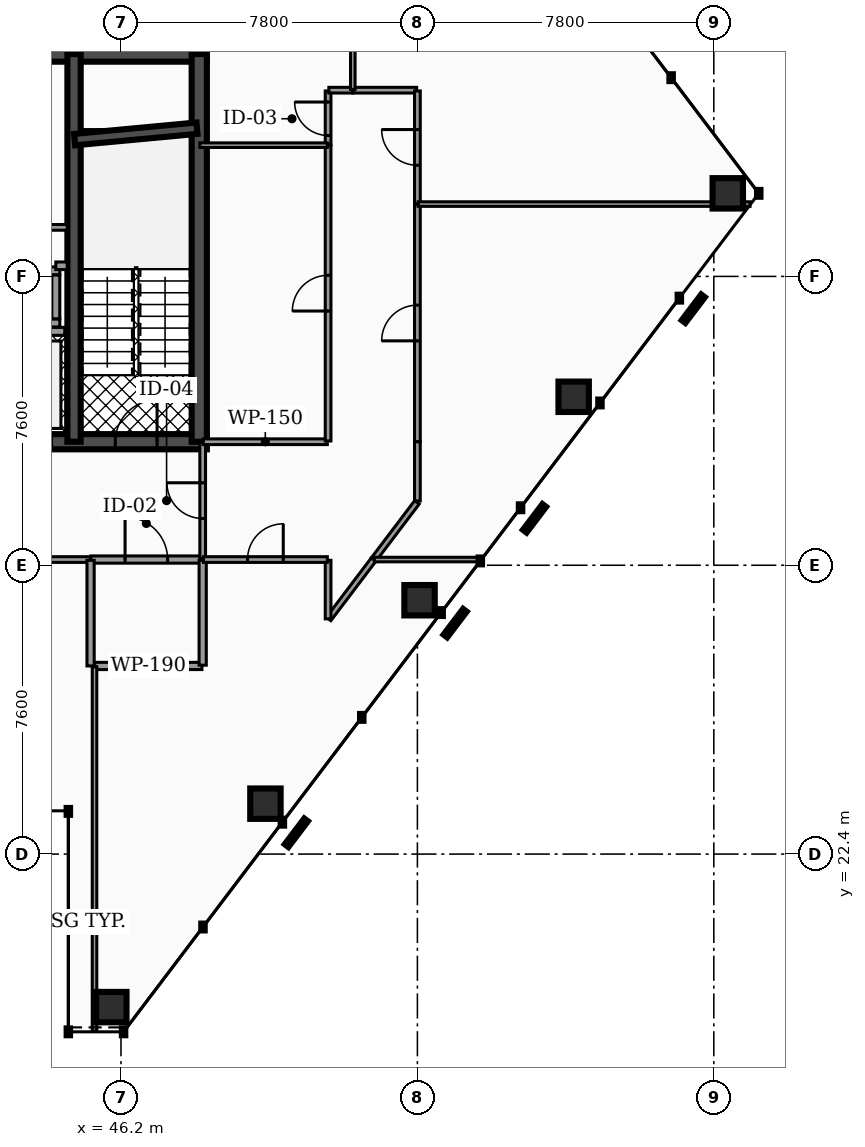
"""IFC4 building model, lengths in metres.
Left out: names, types, materials, properties, quantities, classifications, styles, units other than length and angle.
Written with IfcOpenShell. Run it as: python <this file> out.ifc"""

import sys

from ifc_helpers import new_model, si_unit, direction, frame, frame_2d, origin, origin_2d, place, context, subcontext, project, spatial, rectangle, hollow_rectangle, extrude, element, fill, save


model = new_model("IFC4")
c1 = context("Model", 3, precision=1e-05, world=origin(), true_north=direction((0.0, 1.0)))
c2 = subcontext(c1, "Body", "Model", "MODEL_VIEW")
j1 = project(units=[si_unit("LENGTHUNIT", "METRE"), si_unit("PLANEANGLEUNIT", "RADIAN")], contexts=[c1])
p1 = place(None, origin())
s1 = spatial("IfcSite", under=j1, at=p1, CompositionType="ELEMENT")
p2 = place(p1, origin())
s2 = spatial("IfcBuilding", under=s1, at=p2, CompositionType="ELEMENT")
p3 = place(p2, frame((0.0, 0.0, 160.82)))
s3 = spatial("IfcBuildingStorey", under=s2, at=p3, CompositionType="ELEMENT", Elevation=160.82)
p4 = place(p3, frame((28.4, 43.45, 0.0), z_axis=(0.0, 0.0, 1.0), x_axis=(1.0, 0.0, 0.0)))
e1 = element("IfcWall", 1, at=p4, inside=s3, PredefinedType="SHEAR", context=c2, shape_type="SweptSolid", body=[
    extrude(rectangle(XDim=20.06, YDim=0.4, at=frame_2d((10.03, 0.0))), origin(), (0.0, 0.0, 1.0), 3.5),
])
p5 = place(p3, frame((28.4, 33.25, 0.0), z_axis=(0.0, 0.0, 1.0), x_axis=(1.0, 0.0, 0.0)))
e2 = element("IfcWall", 2, at=p5, inside=s3, PredefinedType="SHEAR", context=c2, shape_type="SweptSolid", body=[
    extrude(rectangle(XDim=20.06, YDim=0.4, at=frame_2d((10.03, 0.0))), origin(), (0.0, 0.0, 1.0), 3.5),
])
p6 = place(p5, frame((4.03, 0.0, 0.0)))
e3 = element("IfcOpeningElement", 3, at=p6, cuts=e2, PredefinedType="OPENING", context=c2, shape_type="SweptSolid", body=[
    extrude(rectangle(XDim=1.1, YDim=2.15, at=frame_2d((0.55, 1.075))), frame((0.0, 0.21, 0.0), z_axis=(0.0, -1.0, 0.0), x_axis=(1.0, 0.0, 0.0)), (0.0, 0.0, 1.0), 0.42),
])
p7 = place(p5, frame((14.87, 0.0, 0.0)))
e4 = element("IfcOpeningElement", 4, at=p7, cuts=e2, PredefinedType="OPENING", context=c2, shape_type="SweptSolid", body=[
    extrude(rectangle(XDim=1.1, YDim=2.15, at=frame_2d((0.55, 1.075))), frame((0.0, 0.21, 0.0), z_axis=(0.0, -1.0, 0.0), x_axis=(1.0, 0.0, 0.0)), (0.0, 0.0, 1.0), 0.42),
])
p8 = place(p5, frame((5.95, 0.0, 0.0)))
e5 = element("IfcOpeningElement", 5, at=p8, cuts=e2, PredefinedType="OPENING", context=c2, shape_type="SweptSolid", body=[
    extrude(rectangle(XDim=1.0, YDim=2.1, at=frame_2d((0.5, 1.05))), frame((0.0, 0.21, 0.0), z_axis=(0.0, -1.0, 0.0), x_axis=(1.0, 0.0, 0.0)), (0.0, 0.0, 1.0), 0.42),
])
p9 = place(p5, frame((7.65, 0.0, 0.0)))
e6 = element("IfcOpeningElement", 6, at=p9, cuts=e2, PredefinedType="OPENING", context=c2, shape_type="SweptSolid", body=[
    extrude(rectangle(XDim=1.0, YDim=2.1, at=frame_2d((0.5, 1.05))), frame((0.0, 0.21, 0.0), z_axis=(0.0, -1.0, 0.0), x_axis=(1.0, 0.0, 0.0)), (0.0, 0.0, 1.0), 0.42),
])
p10 = place(p5, frame((1.31, 0.0, 0.0)))
e7 = element("IfcOpeningElement", 7, at=p10, cuts=e2, PredefinedType="OPENING", context=c2, shape_type="SweptSolid", body=[
    extrude(rectangle(XDim=1.1, YDim=2.2, at=frame_2d((0.55, 1.1))), frame((0.0, 0.21, 0.0), z_axis=(0.0, -1.0, 0.0), x_axis=(1.0, 0.0, 0.0)), (0.0, 0.0, 1.0), 0.42),
])
p11 = place(p5, frame((9.44, 0.0, 0.0)))
e8 = element("IfcOpeningElement", 8, at=p11, cuts=e2, PredefinedType="OPENING", context=c2, shape_type="SweptSolid", body=[
    extrude(rectangle(XDim=1.12, YDim=2.05, at=frame_2d((0.56, 1.025))), frame((0.0, 0.21, 0.0), z_axis=(0.0, -1.0, 0.0), x_axis=(1.0, 0.0, 0.0)), (0.0, 0.0, 1.0), 0.42),
])
p12 = place(p5, frame((17.65, 0.0, 0.0)))
e9 = element("IfcOpeningElement", 9, at=p12, cuts=e2, PredefinedType="OPENING", context=c2, shape_type="SweptSolid", body=[
    extrude(rectangle(XDim=1.1, YDim=2.2, at=frame_2d((0.55, 1.1))), frame((0.0, 0.21, 0.0), z_axis=(0.0, -1.0, 0.0), x_axis=(1.0, 0.0, 0.0)), (0.0, 0.0, 1.0), 0.42),
])
p13 = place(p3, frame((44.965, 33.25, 0.0), z_axis=(0.0, 0.0, 1.0), x_axis=(0.0, 1.0, 0.0)))
e10 = element("IfcWall", 10, at=p13, inside=s3, PredefinedType="SHEAR", context=c2, shape_type="SweptSolid", body=[
    extrude(rectangle(XDim=10.2, YDim=0.35, at=frame_2d((5.1, 0.0))), origin(), (0.0, 0.0, 1.0), 3.5),
])
p14 = place(p3, frame((48.26, 33.25, 0.0), z_axis=(0.0, 0.0, 1.0), x_axis=(0.0, 1.0, 0.0)))
e11 = element("IfcWall", 11, at=p14, inside=s3, PredefinedType="SHEAR", context=c2, shape_type="SweptSolid", body=[
    extrude(rectangle(XDim=10.2, YDim=0.4, at=frame_2d((5.1, 0.0))), origin(), (0.0, 0.0, 1.0), 3.5),
])
p15 = place(p3, frame((44.98, 41.2, 0.0), z_axis=(0.0, 0.0, 1.0), x_axis=(0.995686468965, 0.09278176286, 0.0)))
e12 = element("IfcWall", 12, at=p15, inside=s3, PredefinedType="SHEAR", context=c2, shape_type="SweptSolid", body=[
    extrude(rectangle(XDim=3.234, YDim=0.3, at=frame_2d((1.617, 0.0))), origin(), (0.0, 0.0, 1.0), 3.5),
])
p16 = place(p3, frame((45.946, 18.373, 0.0), z_axis=(-0.058828651938, -0.019980855747, 0.998068111461), x_axis=(0.321601382502, -0.946875150573, 0.0)))
e13 = element("IfcColumn", 13, at=p16, inside=s3, PredefinedType="COLUMN", context=c2, shape_type="SweptSolid", body=[
    extrude(hollow_rectangle(XDim=0.8, YDim=0.8, WallThickness=0.04, at=origin_2d()), origin(), (0.0, 0.0, 1.0), 3.507),
])
p17 = place(p3, frame((50.001, 23.727, 0.0), z_axis=(-0.041676780558, 0.002648357293, 0.999127635573), x_axis=(-0.063417240527, -0.997987100921, 0.0)))
e14 = element("IfcColumn", 14, at=p17, inside=s3, PredefinedType="COLUMN", context=c2, shape_type="SweptSolid", body=[
    extrude(hollow_rectangle(XDim=0.8, YDim=0.8, WallThickness=0.04, at=origin_2d()), origin(), (0.0, 0.0, 1.0), 3.503),
])
p18 = place(p3, frame((54.056, 29.08, 0.0), z_axis=(-0.0244686005, 0.025374844962, 0.999378509291), x_axis=(-0.719844295421, -0.694135570584, 0.0)))
e15 = element("IfcColumn", 15, at=p18, inside=s3, PredefinedType="COLUMN", context=c2, shape_type="SweptSolid", body=[
    extrude(hollow_rectangle(XDim=0.8, YDim=0.8, WallThickness=0.04, at=origin_2d()), origin(), (0.0, 0.0, 1.0), 3.502),
])
p19 = place(p3, frame((58.112, 34.433, 0.0), z_axis=(-0.007315554229, 0.048073642076, 0.998817004062), x_axis=(-0.98861883734, -0.150441996986, 0.0)))
e16 = element("IfcColumn", 16, at=p19, inside=s3, PredefinedType="COLUMN", context=c2, shape_type="SweptSolid", body=[
    extrude(hollow_rectangle(XDim=0.8, YDim=0.8, WallThickness=0.04, at=origin_2d()), origin(), (0.0, 0.0, 1.0), 3.504),
])
p20 = place(p3, frame((62.167, 39.786, 0.0), z_axis=(0.009949439771, 0.070689725925, 0.997448731162), x_axis=(-0.990239771423, 0.139374298537, 0.0)))
e17 = element("IfcColumn", 17, at=p20, inside=s3, PredefinedType="COLUMN", context=c2, shape_type="SweptSolid", body=[
    extrude(hollow_rectangle(XDim=0.8, YDim=0.8, WallThickness=0.04, at=origin_2d()), origin(), (0.0, 0.0, 1.0), 3.509),
])
p21 = place(p3, frame((42.92, 36.155, 0.0), z_axis=(0.0, 0.0, 1.0), x_axis=(1.0, 0.0, 0.0)))
e18 = element("IfcWall", 18, at=p21, inside=s3, PredefinedType="SOLIDWALL", context=c2, shape_type="SweptSolid", body=[
    extrude(rectangle(XDim=1.8, YDim=0.21, at=frame_2d((0.9, 0.0))), origin(), (0.0, 0.0, 1.0), 2.472),
])
for number, where, z_axis, x_axis in (
    (19, (42.99, 36.375, 0.0), (0.0, 0.0, 1.0), (1.0, 0.0, 0.0)),
    (20, (42.99, 37.745, 0.0), (0.0, 0.0, 1.0), (1.0, 0.0, 0.0)),
):
    element("IfcWall", number, at=place(p3, frame(where, z_axis=z_axis, x_axis=x_axis)), inside=s3, PredefinedType="SOLIDWALL", context=c2, shape_type="SweptSolid", body=[
        extrude(rectangle(XDim=1.6, YDim=0.21, at=frame_2d((0.8, 0.0))), origin(), (0.0, 0.0, 1.0), 3.5),
    ])
p22 = place(p3, frame((44.485, 36.485, 0.0), z_axis=(0.0, 0.0, 1.0), x_axis=(0.0, 1.0, 0.0)))
e21 = element("IfcWall", 21, at=p22, inside=s3, PredefinedType="SOLIDWALL", context=c2, shape_type="SweptSolid", body=[
    extrude(rectangle(XDim=1.15, YDim=0.21, at=frame_2d((0.575, 0.0))), origin(), (0.0, 0.0, 1.0), 3.5),
])
p23 = place(p3, frame((42.005, 38.89, 0.0), z_axis=(0.0, 0.0, 1.0), x_axis=(1.0, 0.0, 0.0)))
e22 = element("IfcWall", 22, at=p23, inside=s3, PredefinedType="PARTITIONING", context=c2, shape_type="SweptSolid", body=[
    extrude(rectangle(XDim=2.78, YDim=0.15, at=frame_2d((1.39, 0.0))), origin(), (0.0, 0.0, 1.0), 2.457),
])
p24 = place(p23, frame((0.92, 0.0, 0.0)))
e23 = element("IfcOpeningElement", 23, at=p24, cuts=e22, PredefinedType="OPENING", context=c2, shape_type="SweptSolid", body=[
    extrude(rectangle(XDim=0.94, YDim=2.05, at=frame_2d((0.47, 1.025))), frame((0.0, 0.085, 0.0), z_axis=(0.0, -1.0, 0.0), x_axis=(1.0, 0.0, 0.0)), (0.0, 0.0, 1.0), 0.17),
])
p25 = place(p3, frame((44.485, 37.88, 0.0), z_axis=(0.0, 0.0, 1.0), x_axis=(1.0, 0.0, 0.0)))
e24 = element("IfcWall", 24, at=p25, inside=s3, PredefinedType="PARTITIONING", context=c2, shape_type="SweptSolid", body=[
    extrude(rectangle(XDim=0.3, YDim=0.2, at=frame_2d((0.15, 0.0))), origin(), (0.0, 0.0, 1.0), 2.457),
])
p26 = place(p3, frame((45.405, 30.15, 0.0), z_axis=(0.0, 0.0, 1.0), x_axis=(1.0, 0.0, 0.0)))
e25 = element("IfcWall", 25, at=p26, inside=s3, PredefinedType="PARTITIONING", context=c2, shape_type="SweptSolid", body=[
    extrude(rectangle(XDim=2.925, YDim=0.19, at=frame_2d((1.462, 0.0))), origin(), (0.0, 0.0, 1.0), 2.457),
])
p27 = place(p26, frame((0.903, 0.0, 0.0)))
e26 = element("IfcOpeningElement", 26, at=p27, cuts=e25, PredefinedType="OPENING", context=c2, shape_type="SweptSolid", body=[
    extrude(rectangle(XDim=1.12, YDim=2.05, at=frame_2d((0.56, 1.025))), frame((0.0, 0.105, 0.0), z_axis=(0.0, -1.0, 0.0), x_axis=(1.0, 0.0, 0.0)), (0.0, 0.0, 1.0), 0.21),
])
p28 = place(p3, frame((48.35, 30.17, 0.0), z_axis=(0.0, 0.0, 1.0), x_axis=(0.0, 1.0, 0.0)))
e27 = element("IfcWall", 27, at=p28, inside=s3, PredefinedType="PARTITIONING", context=c2, shape_type="SweptSolid", body=[
    extrude(rectangle(XDim=3.06, YDim=0.15, at=frame_2d((1.53, 0.0))), origin(), (0.0, 0.0, 1.0), 2.457),
])
p29 = place(p28, frame((1.06, 0.0, 0.0)))
e28 = element("IfcOpeningElement", 28, at=p29, cuts=e27, PredefinedType="OPENING", context=c2, shape_type="SweptSolid", body=[
    extrude(rectangle(XDim=0.94, YDim=2.05, at=frame_2d((0.47, 1.025))), frame((0.0, 0.085, 0.0), z_axis=(0.0, -1.0, 0.0), x_axis=(1.0, 0.0, 0.0)), (0.0, 0.0, 1.0), 0.17),
])
p30 = place(p3, frame((35.385, 30.15, 0.0), z_axis=(0.0, 0.0, 1.0), x_axis=(1.0, 0.0, 0.0)))
e29 = element("IfcWall", 29, at=p30, inside=s3, PredefinedType="PARTITIONING", context=c2, shape_type="SweptSolid", body=[
    extrude(rectangle(XDim=10.01, YDim=0.15, at=frame_2d((5.005, 0.0))), origin(), (0.0, 0.0, 1.0), 2.457),
])
p31 = place(p30, frame((7.935, 0.0, 0.0)))
e30 = element("IfcOpeningElement", 30, at=p31, cuts=e29, PredefinedType="OPENING", context=c2, shape_type="SweptSolid", body=[
    extrude(rectangle(XDim=0.94, YDim=2.05, at=frame_2d((0.47, 1.025))), frame((0.0, 0.085, 0.0), z_axis=(0.0, -1.0, 0.0), x_axis=(1.0, 0.0, 0.0)), (0.0, 0.0, 1.0), 0.17),
])
p32 = place(p3, frame((45.509, 27.35, 0.0), z_axis=(0.0, 0.0, 1.0), x_axis=(1.0, 0.0, 0.0)))
e31 = element("IfcWall", 31, at=p32, inside=s3, PredefinedType="PARTITIONING", context=c2, shape_type="SweptSolid", body=[
    extrude(rectangle(XDim=2.821, YDim=0.19, at=frame_2d((1.411, 0.0))), origin(), (0.0, 0.0, 1.0), 2.457),
])
p33 = place(p3, frame((48.35, 27.37, 0.0), z_axis=(0.0, 0.0, 1.0), x_axis=(0.0, 1.0, 0.0)))
e32 = element("IfcWall", 32, at=p33, inside=s3, PredefinedType="PARTITIONING", context=c2, shape_type="SweptSolid", body=[
    extrude(rectangle(XDim=2.76, YDim=0.19, at=frame_2d((1.38, 0.0))), origin(), (0.0, 0.0, 1.0), 2.457),
])
p34 = place(p3, frame((45.4, 27.35, 0.0), z_axis=(0.0, 0.0, 1.0), x_axis=(0.0, 1.0, 0.0)))
e33 = element("IfcWall", 33, at=p34, inside=s3, PredefinedType="PARTITIONING", context=c2, shape_type="SweptSolid", body=[
    extrude(rectangle(XDim=2.78, YDim=0.19, at=frame_2d((1.39, 0.0))), origin(), (0.0, 0.0, 1.0), 2.457),
])
p35 = place(p3, frame((51.662, 28.585, 0.0), z_axis=(0.0, 0.0, 1.0), x_axis=(0.603776226183, 0.797153855097, 0.0)))
e34 = element("IfcWall", 34, at=p35, inside=s3, PredefinedType="PARTITIONING", context=c2, shape_type="SweptSolid", body=[
    extrude(rectangle(XDim=1.962, YDim=0.15, at=frame_2d((0.981, 0.0))), origin(), (0.0, 0.0, 1.0), 2.457),
])
p36 = place(p3, frame((51.65, 28.589, 0.0), z_axis=(0.0, 0.0, 1.0), x_axis=(0.0, 1.0, 0.0)))
e35 = element("IfcWall", 35, at=p36, inside=s3, PredefinedType="PARTITIONING", context=c2, shape_type="SweptSolid", body=[
    extrude(rectangle(XDim=1.541, YDim=0.15, at=frame_2d((0.77, 0.0))), origin(), (0.0, 0.0, 1.0), 2.457),
])
p37 = place(p3, frame((48.37, 30.15, 0.0), z_axis=(0.0, 0.0, 1.0), x_axis=(1.0, 0.0, 0.0)))
e36 = element("IfcWall", 36, at=p37, inside=s3, PredefinedType="PARTITIONING", context=c2, shape_type="SweptSolid", body=[
    extrude(rectangle(XDim=3.26, YDim=0.15, at=frame_2d((1.63, 0.0))), origin(), (0.0, 0.0, 1.0), 2.457),
])
p38 = place(p37, frame((1.16, 0.0, 0.0)))
e37 = element("IfcOpeningElement", 37, at=p38, cuts=e36, PredefinedType="OPENING", context=c2, shape_type="SweptSolid", body=[
    extrude(rectangle(XDim=0.94, YDim=2.05, at=frame_2d((0.47, 1.025))), frame((0.0, 0.085, 0.0), z_axis=(0.0, -1.0, 0.0), x_axis=(1.0, 0.0, 0.0)), (0.0, 0.0, 1.0), 0.17),
])
p39 = place(p3, frame((54.0, 33.25, 0.0), z_axis=(0.0, 0.0, 1.0), x_axis=(0.0, 1.0, 0.0)))
e38 = element("IfcWall", 38, at=p39, inside=s3, PredefinedType="PARTITIONING", context=c2, shape_type="SweptSolid", body=[
    extrude(rectangle(XDim=6.248, YDim=0.15, at=frame_2d((3.124, 0.0))), origin(), (0.0, 0.0, 1.0), 2.457),
])
p40 = place(p39, frame((2.654, 0.0, 0.0)))
e39 = element("IfcOpeningElement", 39, at=p40, cuts=e38, PredefinedType="OPENING", context=c2, shape_type="SweptSolid", body=[
    extrude(rectangle(XDim=0.94, YDim=2.05, at=frame_2d((0.47, 1.025))), frame((0.0, 0.085, 0.0), z_axis=(0.0, -1.0, 0.0), x_axis=(1.0, 0.0, 0.0)), (0.0, 0.0, 1.0), 0.17),
])
p41 = place(p3, frame((54.0, 31.691, 0.0), z_axis=(0.0, 0.0, 1.0), x_axis=(0.0, 1.0, 0.0)))
e40 = element("IfcWall", 40, at=p41, inside=s3, PredefinedType="PARTITIONING", context=c2, shape_type="SweptSolid", body=[
    extrude(rectangle(XDim=1.559, YDim=0.15, at=frame_2d((0.779, 0.0))), origin(), (0.0, 0.0, 1.0), 2.457),
])
p42 = place(p3, frame((52.851, 30.154, 0.0), z_axis=(0.0, 0.0, 1.0), x_axis=(0.603767842841, 0.797160204696, 0.0)))
e41 = element("IfcWall", 41, at=p42, inside=s3, PredefinedType="PARTITIONING", context=c2, shape_type="SweptSolid", body=[
    extrude(rectangle(XDim=1.884, YDim=0.15, at=frame_2d((0.942, 0.0))), origin(), (0.0, 0.0, 1.0), 2.457),
])
p43 = place(p3, frame((52.305, 42.5, 0.0), z_axis=(0.0, 0.0, 1.0), x_axis=(1.0, 0.0, 0.0)))
e42 = element("IfcWall", 42, at=p43, inside=s3, PredefinedType="PARTITIONING", context=c2, shape_type="SweptSolid", body=[
    extrude(rectangle(XDim=1.675, YDim=0.15, at=frame_2d((0.837, 0.0))), origin(), (0.0, 0.0, 1.0), 2.457),
])
p44 = place(p3, frame((54.0, 39.508, 0.0), z_axis=(0.0, 0.0, 1.0), x_axis=(0.0, 1.0, 0.0)))
e43 = element("IfcWall", 43, at=p44, inside=s3, PredefinedType="PARTITIONING", context=c2, shape_type="SweptSolid", body=[
    extrude(rectangle(XDim=2.972, YDim=0.15, at=frame_2d((1.486, 0.0))), origin(), (0.0, 0.0, 1.0), 2.457),
])
p45 = place(p44, frame((1.016, 0.0, 0.0)))
e44 = element("IfcOpeningElement", 44, at=p45, cuts=e43, PredefinedType="OPENING", context=c2, shape_type="SweptSolid", body=[
    extrude(rectangle(XDim=0.94, YDim=2.05, at=frame_2d((0.47, 1.025))), frame((0.0, 0.085, 0.0), z_axis=(0.0, -1.0, 0.0), x_axis=(1.0, 0.0, 0.0)), (0.0, 0.0, 1.0), 0.17),
])
p46 = place(p3, frame((48.365, 33.25, 0.0), z_axis=(0.0, 0.0, 1.0), x_axis=(1.0, 0.0, 0.0)))
e45 = element("IfcWall", 45, at=p46, inside=s3, PredefinedType="PARTITIONING", context=c2, shape_type="SweptSolid", body=[
    extrude(rectangle(XDim=3.265, YDim=0.15, at=frame_2d((1.632, 0.0))), origin(), (0.0, 0.0, 1.0), 2.457),
])
p47 = place(p3, frame((51.65, 33.27, 0.0), z_axis=(0.0, 0.0, 1.0), x_axis=(0.0, 1.0, 0.0)))
e46 = element("IfcWall", 46, at=p47, inside=s3, PredefinedType="PARTITIONING", context=c2, shape_type="SweptSolid", body=[
    extrude(rectangle(XDim=7.778, YDim=0.15, at=frame_2d((3.889, 0.0))), origin(), (0.0, 0.0, 1.0), 2.457),
])
p48 = place(p47, frame((3.419, 0.0, 0.0)))
e47 = element("IfcOpeningElement", 47, at=p48, cuts=e46, PredefinedType="OPENING", context=c2, shape_type="SweptSolid", body=[
    extrude(rectangle(XDim=0.94, YDim=2.05, at=frame_2d((0.47, 1.025))), frame((0.0, 0.085, 0.0), z_axis=(0.0, -1.0, 0.0), x_axis=(1.0, 0.0, 0.0)), (0.0, 0.0, 1.0), 0.17),
])
p49 = place(p3, frame((51.65, 41.058, 0.0), z_axis=(0.0, 0.0, 1.0), x_axis=(0.0, 1.0, 0.0)))
e48 = element("IfcWall", 48, at=p49, inside=s3, PredefinedType="PARTITIONING", context=c2, shape_type="SweptSolid", body=[
    extrude(rectangle(XDim=1.422, YDim=0.15, at=frame_2d((0.711, 0.0))), origin(), (0.0, 0.0, 1.0), 2.457),
])
p50 = place(p49, frame((0.25, 0.0, 0.0)))
e49 = element("IfcOpeningElement", 49, at=p50, cuts=e48, PredefinedType="OPENING", context=c2, shape_type="SweptSolid", body=[
    extrude(rectangle(XDim=0.88, YDim=2.05, at=frame_2d((0.44, 1.025))), frame((0.0, 0.085, 0.0), z_axis=(0.0, -1.0, 0.0), x_axis=(1.0, 0.0, 0.0)), (0.0, 0.0, 1.0), 0.17),
])
p51 = place(p3, frame((51.67, 42.5, 0.0), z_axis=(0.0, 0.0, 1.0), x_axis=(1.0, 0.0, 0.0)))
e50 = element("IfcWall", 50, at=p51, inside=s3, PredefinedType="PARTITIONING", context=c2, shape_type="SweptSolid", body=[
    extrude(rectangle(XDim=0.625, YDim=0.15, at=frame_2d((0.312, 0.0))), origin(), (0.0, 0.0, 1.0), 2.457),
])
p52 = place(p3, frame((45.504, 17.738, 0.0), z_axis=(0.0, 0.0, 1.0), x_axis=(0.0, 1.0, 0.0)))
e51 = element("IfcWall", 51, at=p52, inside=s3, PredefinedType="PARTITIONING", context=c2, shape_type="SweptSolid", body=[
    extrude(rectangle(XDim=9.592, YDim=0.12, at=frame_2d((4.796, 0.0))), origin(), (0.0, 0.0, 1.0), 2.457),
])
p53 = place(p3, frame((52.867, 30.15, 0.0), z_axis=(0.0, 0.0, 1.0), x_axis=(1.0, 0.0, 0.0)))
e52 = element("IfcWall", 52, at=p53, inside=s3, PredefinedType="PARTITIONING", context=c2, shape_type="SweptSolid", body=[
    extrude(rectangle(XDim=2.8, YDim=0.12, at=frame_2d((1.4, 0.0))), origin(), (0.0, 0.0, 1.0), 2.457),
])
p54 = place(p3, frame((54.02, 39.503, 0.0), z_axis=(0.0, 0.0, 1.0), x_axis=(1.0, 0.0, 0.0)))
e53 = element("IfcWall", 53, at=p54, inside=s3, PredefinedType="PARTITIONING", context=c2, shape_type="SweptSolid", body=[
    extrude(rectangle(XDim=8.734, YDim=0.12, at=frame_2d((4.367, 0.0))), origin(), (0.0, 0.0, 1.0), 2.457),
])
p55 = place(p3, frame((52.3, 42.52, 0.0), z_axis=(0.0, 0.0, 1.0), x_axis=(0.0, 1.0, 0.0)))
e54 = element("IfcWall", 54, at=p55, inside=s3, PredefinedType="PARTITIONING", context=c2, shape_type="SweptSolid", body=[
    extrude(rectangle(XDim=6.382, YDim=0.12, at=frame_2d((3.191, 0.0))), origin(), (0.0, 0.0, 1.0), 2.457),
])
p56 = place(p3, frame((48.275, 41.053, 0.0), z_axis=(0.0, 0.0, 1.0), x_axis=(1.0, 0.0, 0.0)))
e55 = element("IfcWall", 55, at=p56, inside=s3, PredefinedType="PARTITIONING", context=c2, shape_type="SweptSolid", body=[
    extrude(rectangle(XDim=3.355, YDim=0.12, at=frame_2d((1.677, 0.0))), origin(), (0.0, 0.0, 1.0), 2.457),
])
p57 = place(p12, origin())
e56 = element("IfcDoor", 56, at=p57, inside=s3, OperationType="SINGLE_SWING_RIGHT", PredefinedType="DOOR", context=c2, shape_type="SweptSolid", body=[
    extrude(rectangle(XDim=1.1, YDim=2.2, at=frame_2d((0.55, 1.1))), frame((0.0, 0.025, 0.0), z_axis=(0.0, -1.0, 0.0), x_axis=(1.0, 0.0, 0.0)), (0.0, 0.0, 1.0), 0.05),
])
fill(e9, e56)
p58 = place(p27, origin())
e57 = element("IfcDoor", 57, at=p58, inside=s3, OperationType="SINGLE_SWING_LEFT", PredefinedType="DOOR", context=c2, shape_type="SweptSolid", body=[
    extrude(rectangle(XDim=1.12, YDim=2.05, at=frame_2d((0.56, 1.025))), frame((0.0, 0.025, 0.0), z_axis=(0.0, -1.0, 0.0), x_axis=(1.0, 0.0, 0.0)), (0.0, 0.0, 1.0), 0.05),
])
fill(e26, e57)
p59 = place(p29, origin())
e58 = element("IfcDoor", 58, at=p59, inside=s3, OperationType="SINGLE_SWING_RIGHT", PredefinedType="DOOR", context=c2, shape_type="SweptSolid", body=[
    extrude(rectangle(XDim=0.94, YDim=2.05, at=frame_2d((0.47, 1.025))), frame((0.0, 0.025, 0.0), z_axis=(0.0, -1.0, 0.0), x_axis=(1.0, 0.0, 0.0)), (0.0, 0.0, 1.0), 0.05),
])
fill(e28, e58)
p60 = place(p38, origin())
e59 = element("IfcDoor", 59, at=p60, inside=s3, OperationType="SINGLE_SWING_RIGHT", PredefinedType="DOOR", context=c2, shape_type="SweptSolid", body=[
    extrude(rectangle(XDim=0.94, YDim=2.05, at=frame_2d((0.47, 1.025))), frame((0.0, 0.025, 0.0), z_axis=(0.0, -1.0, 0.0), x_axis=(1.0, 0.0, 0.0)), (0.0, 0.0, 1.0), 0.05),
])
fill(e37, e59)
p61 = place(p40, origin())
e60 = element("IfcDoor", 60, at=p61, inside=s3, OperationType="SINGLE_SWING_LEFT", PredefinedType="DOOR", context=c2, shape_type="SweptSolid", body=[
    extrude(rectangle(XDim=0.94, YDim=2.05, at=frame_2d((0.47, 1.025))), frame((0.0, 0.025, 0.0), z_axis=(0.0, -1.0, 0.0), x_axis=(1.0, 0.0, 0.0)), (0.0, 0.0, 1.0), 0.05),
])
fill(e39, e60)
p62 = place(p45, origin())
e61 = element("IfcDoor", 61, at=p62, inside=s3, OperationType="SINGLE_SWING_RIGHT", PredefinedType="DOOR", context=c2, shape_type="SweptSolid", body=[
    extrude(rectangle(XDim=0.94, YDim=2.05, at=frame_2d((0.47, 1.025))), frame((0.0, 0.025, 0.0), z_axis=(0.0, -1.0, 0.0), x_axis=(1.0, 0.0, 0.0)), (0.0, 0.0, 1.0), 0.05),
])
fill(e44, e61)
p63 = place(p48, origin())
e62 = element("IfcDoor", 62, at=p63, inside=s3, OperationType="SINGLE_SWING_LEFT", PredefinedType="DOOR", context=c2, shape_type="SweptSolid", body=[
    extrude(rectangle(XDim=0.94, YDim=2.05, at=frame_2d((0.47, 1.025))), frame((0.0, 0.025, 0.0), z_axis=(0.0, -1.0, 0.0), x_axis=(1.0, 0.0, 0.0)), (0.0, 0.0, 1.0), 0.05),
])
fill(e47, e62)
p64 = place(p50, origin())
e63 = element("IfcDoor", 63, at=p64, inside=s3, OperationType="SINGLE_SWING_RIGHT", PredefinedType="DOOR", context=c2, shape_type="SweptSolid", body=[
    extrude(rectangle(XDim=0.88, YDim=2.05, at=frame_2d((0.44, 1.025))), frame((0.0, 0.025, 0.0), z_axis=(0.0, -1.0, 0.0), x_axis=(1.0, 0.0, 0.0)), (0.0, 0.0, 1.0), 0.05),
])
fill(e49, e63)
save(model, sys.argv[1])
